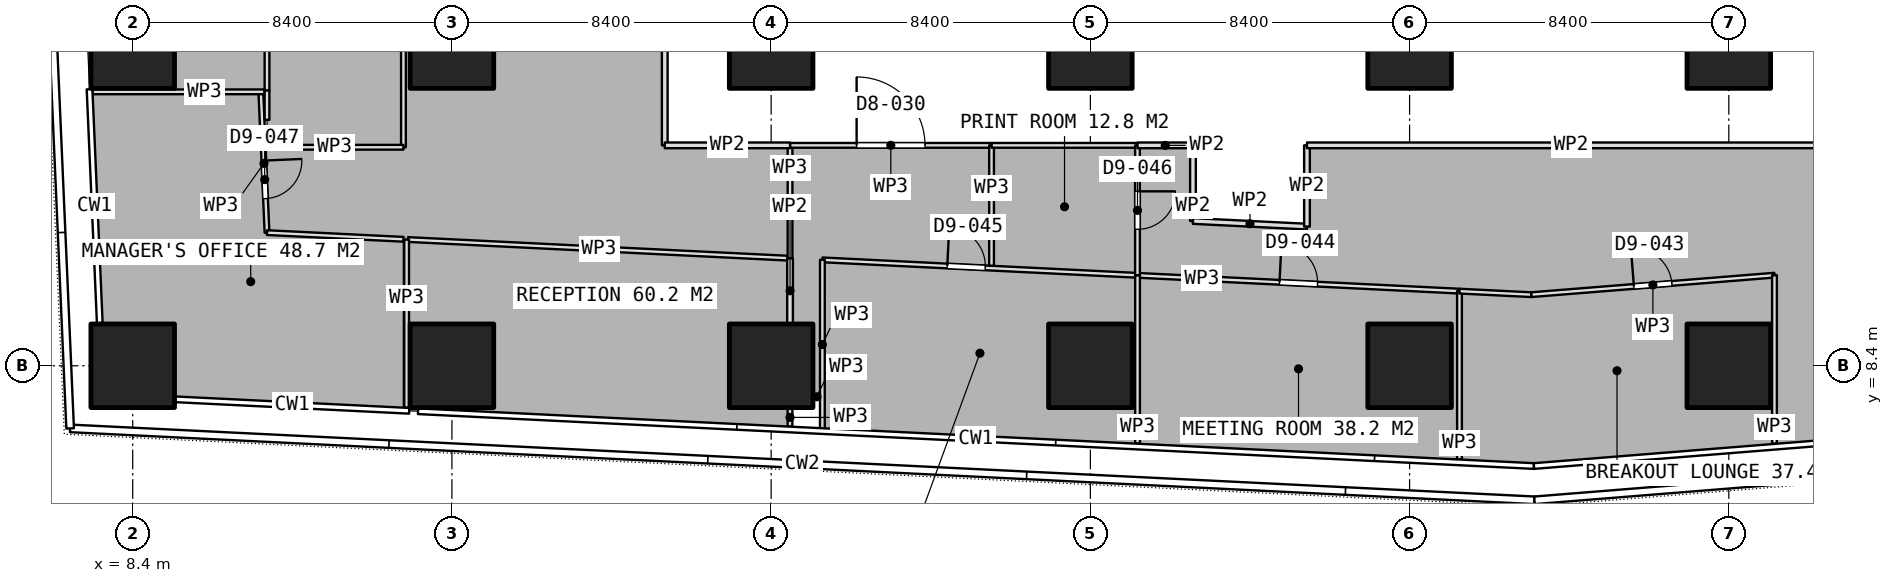
"""IFC4 building model, lengths in metres.
Left out: names, types, materials, properties, quantities, classifications, styles, units other than length and angle.
Written with IfcOpenShell. Run it as: python <this file> out.ifc"""

import sys

from ifc_helpers import new_model, si_unit, direction, frame, frame_2d, origin, origin_2d, place, context, subcontext, project, spatial, rectangle, extrude, element, fill, save


model = new_model("IFC4")
c1 = context("Model", 3, precision=1e-05, world=origin(), true_north=direction((0.0, 1.0)))
c2 = subcontext(c1, "Body", "Model", "MODEL_VIEW")
j1 = project(units=[si_unit("LENGTHUNIT", "METRE"), si_unit("PLANEANGLEUNIT", "RADIAN")], contexts=[c1])
p1 = place(None, origin())
s1 = spatial("IfcSite", under=j1, at=p1, CompositionType="ELEMENT")
p2 = place(p1, origin())
s2 = spatial("IfcBuilding", under=s1, at=p2, CompositionType="ELEMENT")
p3 = place(p2, frame((0.0, 0.0, 32.9)))
s3 = spatial("IfcBuildingStorey", under=s2, at=p3, CompositionType="ELEMENT", Elevation=32.9)
for number, where, z_axis, x_axis in (
    (1, (8.4, 8.4, 0.0), (0.0, 0.0, 1.0), (1.0, 0.0, 0.0)),
    (2, (8.4, 16.8, 0.0), (0.0, 0.0, 1.0), (1.0, 0.0, 0.0)),
    (3, (16.8, 8.4, 0.0), (0.0, 0.0, 1.0), (1.0, 0.0, 0.0)),
    (4, (16.8, 16.8, 0.0), (0.0, 0.0, 1.0), (1.0, 0.0, 0.0)),
    (5, (25.2, 8.4, 0.0), (0.0, 0.0, 1.0), (1.0, 0.0, 0.0)),
    (6, (25.2, 16.8, 0.0), (0.0, 0.0, 1.0), (1.0, 0.0, 0.0)),
    (7, (33.6, 8.4, 0.0), (0.0, 0.0, 1.0), (1.0, 0.0, 0.0)),
    (8, (33.6, 16.8, 0.0), (0.0, 0.0, 1.0), (1.0, 0.0, 0.0)),
    (9, (42.0, 8.4, 0.0), (0.0, 0.0, 1.0), (1.0, 0.0, 0.0)),
    (10, (42.0, 16.8, 0.0), (0.0, 0.0, 1.0), (1.0, 0.0, 0.0)),
    (11, (50.4, 8.4, 0.0), (0.0, 0.0, 1.0), (1.0, 0.0, 0.0)),
    (12, (50.4, 16.8, 0.0), (0.0, 0.0, 1.0), (1.0, 0.0, 0.0)),
):
    element("IfcColumn", number, at=place(p3, frame(where, z_axis=z_axis, x_axis=x_axis)), inside=s3, PredefinedType="COLUMN", context=c2, shape_type="SweptSolid", body=[
        extrude(rectangle(XDim=2.2, YDim=2.2, at=origin_2d()), origin(), (0.0, 0.0, 1.0), 3.75),
    ])
p4 = place(p3, frame((34.841, 10.78, 0.0), z_axis=(0.0, 0.0, 1.0), x_axis=(0.998796515078, -0.049046115723, 0.0)))
e13 = element("IfcWall", 13, at=p4, inside=s3, PredefinedType="PARTITIONING", context=c2, shape_type="SweptSolid", body=[
    extrude(rectangle(XDim=8.482, YDim=0.125, at=frame_2d((4.241, 0.0))), origin(), (0.0, 0.0, 1.0), 3.5),
])
p5 = place(p4, frame((3.741, 0.0, 0.0)))
e14 = element("IfcOpeningElement", 14, at=p5, cuts=e13, PredefinedType="OPENING", context=c2, shape_type="SweptSolid", body=[
    extrude(rectangle(XDim=1.0, YDim=2.1, at=frame_2d((0.5, 1.05))), frame((0.0, 0.073, 0.0), z_axis=(0.0, -1.0, 0.0), x_axis=(1.0, 0.0, 0.0)), (0.0, 0.0, 1.0), 0.145),
])
for number, where, z_axis, x_axis in (
    (15, (43.313, 10.364, 0.0), (0.0, 0.0, 1.0), (0.0, -1.0, 0.0)),
    (16, (34.841, 6.354, 0.0), (0.0, 0.0, 1.0), (0.0, 1.0, 0.0)),
):
    element("IfcWall", number, at=place(p3, frame(where, z_axis=z_axis, x_axis=x_axis)), inside=s3, PredefinedType="PARTITIONING", context=c2, shape_type="SweptSolid", body=[
        extrude(rectangle(XDim=4.426, YDim=0.125, at=frame_2d((2.213, 0.0))), origin(), (0.0, 0.0, 1.0), 3.5),
    ])
p6 = place(p3, frame((43.314, 10.364, 0.0), z_axis=(0.0, 0.0, 1.0), x_axis=(0.998788470102, -0.04920967375, 0.0)))
e17 = element("IfcWall", 17, at=p6, inside=s3, PredefinedType="PARTITIONING", context=c2, shape_type="SweptSolid", body=[
    extrude(rectangle(XDim=1.89, YDim=0.125, at=frame_2d((0.945, 0.0))), origin(), (0.0, 0.0, 1.0), 3.5),
])
p7 = place(p3, frame((45.202, 10.271, 0.0), z_axis=(0.0, 0.0, 1.0), x_axis=(0.996803782356, 0.079888794459, 0.0)))
e18 = element("IfcWall", 18, at=p7, inside=s3, PredefinedType="PARTITIONING", context=c2, shape_type="SweptSolid", body=[
    extrude(rectangle(XDim=6.421, YDim=0.125, at=frame_2d((3.21, 0.0))), origin(), (0.0, 0.0, 1.0), 3.5),
])
p8 = place(p7, frame((2.71, 0.0, 0.0)))
e19 = element("IfcOpeningElement", 19, at=p8, cuts=e18, PredefinedType="OPENING", context=c2, shape_type="SweptSolid", body=[
    extrude(rectangle(XDim=1.0, YDim=2.1, at=frame_2d((0.5, 1.05))), frame((0.0, 0.073, 0.0), z_axis=(0.0, -1.0, 0.0), x_axis=(1.0, 0.0, 0.0)), (0.0, 0.0, 1.0), 0.145),
])
p9 = place(p3, frame((51.602, 10.784, 0.0), z_axis=(0.0, 0.0, 1.0), x_axis=(0.0, -1.0, 0.0)))
e20 = element("IfcWall", 20, at=p9, inside=s3, PredefinedType="PARTITIONING", context=c2, shape_type="SweptSolid", body=[
    extrude(rectangle(XDim=4.435, YDim=0.125, at=frame_2d((2.217, 0.0))), origin(), (0.0, 0.0, 1.0), 3.5),
])
p10 = place(p3, frame((26.548, 11.187, 0.0), z_axis=(0.0, 0.0, 1.0), x_axis=(0.998797680893, -0.049022368804, 0.0)))
e21 = element("IfcWall", 21, at=p10, inside=s3, PredefinedType="PARTITIONING", context=c2, shape_type="SweptSolid", body=[
    extrude(rectangle(XDim=8.302, YDim=0.125, at=frame_2d((4.151, 0.0))), origin(), (0.0, 0.0, 1.0), 3.5),
])
p11 = place(p10, frame((3.291, 0.0, 0.0)))
e22 = element("IfcOpeningElement", 22, at=p11, cuts=e21, PredefinedType="OPENING", context=c2, shape_type="SweptSolid", body=[
    extrude(rectangle(XDim=1.0, YDim=2.1, at=frame_2d((0.5, 1.05))), frame((0.0, 0.073, 0.0), z_axis=(0.0, -1.0, 0.0), x_axis=(1.0, 0.0, 0.0)), (0.0, 0.0, 1.0), 0.145),
])
p12 = place(p3, frame((26.548, 6.732, 0.0), z_axis=(0.0, 0.0, 1.0), x_axis=(0.0, 1.0, 0.0)))
e23 = element("IfcWall", 23, at=p12, inside=s3, PredefinedType="PARTITIONING", context=c2, shape_type="SweptSolid", body=[
    extrude(rectangle(XDim=4.455, YDim=0.125, at=frame_2d((2.228, 0.0))), origin(), (0.0, 0.0, 1.0), 3.5),
])
p13 = place(p3, frame((15.643, 11.722, 0.0), z_axis=(0.0, 0.0, 1.0), x_axis=(0.998800316201, -0.048968646667, 0.0)))
e24 = element("IfcWall", 24, at=p13, inside=s3, PredefinedType="PARTITIONING", context=c2, shape_type="SweptSolid", body=[
    extrude(rectangle(XDim=10.066, YDim=0.125, at=frame_2d((5.033, 0.0))), origin(), (0.0, 0.0, 1.0), 3.5),
])
p14 = place(p3, frame((25.697, 11.229, 0.0), z_axis=(0.0, 0.0, 1.0), x_axis=(0.0, 1.0, 0.0)))
e25 = element("IfcWall", 25, at=p14, inside=s3, PredefinedType="PARTITIONING", context=c2, shape_type="SweptSolid", body=[
    extrude(rectangle(XDim=2.971, YDim=0.125, at=frame_2d((1.485, 0.0))), origin(), (0.0, 0.0, 1.0), 3.5),
])
p15 = place(p3, frame((25.697, 14.2, 0.0), z_axis=(0.0, 0.0, 1.0), x_axis=(1.0, 0.0, 0.0)))
e26 = element("IfcWall", 26, at=p15, inside=s3, PredefinedType="PARTITIONING", context=c2, shape_type="SweptSolid", body=[
    extrude(rectangle(XDim=5.303, YDim=0.125, at=frame_2d((2.651, 0.0))), origin(), (0.0, 0.0, 1.0), 3.5),
])
p16 = place(p15, frame((1.752, 0.0, 0.0)))
e27 = element("IfcOpeningElement", 27, at=p16, cuts=e26, PredefinedType="OPENING", context=c2, shape_type="SweptSolid", body=[
    extrude(rectangle(XDim=1.8, YDim=2.1, at=frame_2d((0.9, 1.05))), frame((0.0, 0.073, 0.0), z_axis=(0.0, -1.0, 0.0), x_axis=(1.0, 0.0, 0.0)), (0.0, 0.0, 1.0), 0.145),
])
p17 = place(p3, frame((31.0, 14.2, 0.0), z_axis=(0.0, 0.0, 1.0), x_axis=(0.0, -1.0, 0.0)))
e28 = element("IfcWall", 28, at=p17, inside=s3, PredefinedType="PARTITIONING", context=c2, shape_type="SweptSolid", body=[
    extrude(rectangle(XDim=3.169, YDim=0.125, at=frame_2d((1.584, 0.0))), origin(), (0.0, 0.0, 1.0), 3.5),
])
p18 = place(p3, frame((26.485, 7.584, 0.0), z_axis=(0.0, 0.0, 1.0), x_axis=(-1.0, 0.0, 0.0)))
e29 = element("IfcWall", 29, at=p18, inside=s3, PredefinedType="PARTITIONING", context=c2, shape_type="SweptSolid", body=[
    extrude(rectangle(XDim=0.165, YDim=0.125, at=frame_2d((0.083, 0.0))), origin(), (0.0, 0.0, 1.0), 3.5),
])
p19 = place(p3, frame((25.696, 7.28, 0.0), z_axis=(0.0, 0.0, 1.0), x_axis=(0.0, -1.0, 0.0)))
e30 = element("IfcWall", 30, at=p19, inside=s3, PredefinedType="PARTITIONING", context=c2, shape_type="SweptSolid", body=[
    extrude(rectangle(XDim=0.477, YDim=0.125, at=frame_2d((0.239, 0.0))), origin(), (0.0, 0.0, 1.0), 3.5),
])
p20 = place(p3, frame((15.608, 7.299, 0.0), z_axis=(0.0, 0.0, 1.0), x_axis=(0.0, 1.0, 0.0)))
e31 = element("IfcWall", 31, at=p20, inside=s3, PredefinedType="PARTITIONING", context=c2, shape_type="SweptSolid", body=[
    extrude(rectangle(XDim=4.423, YDim=0.125, at=frame_2d((2.211, 0.0))), origin(), (0.0, 0.0, 1.0), 3.5),
])
p21 = place(p3, frame((31.0, 14.2, 0.0), z_axis=(0.0, 0.0, 1.0), x_axis=(1.0, 0.0, 0.0)))
e32 = element("IfcWall", 32, at=p21, inside=s3, PredefinedType="PARTITIONING", context=c2, shape_type="SweptSolid", body=[
    extrude(rectangle(XDim=3.84, YDim=0.125, at=frame_2d((1.92, 0.0))), origin(), (0.0, 0.0, 1.0), 3.5),
])
p22 = place(p3, frame((34.84, 14.2, 0.0), z_axis=(0.0, 0.0, 1.0), x_axis=(0.0, -1.0, 0.0)))
e33 = element("IfcWall", 33, at=p22, inside=s3, PredefinedType="PARTITIONING", context=c2, shape_type="SweptSolid", body=[
    extrude(rectangle(XDim=3.42, YDim=0.125, at=frame_2d((1.71, 0.0))), origin(), (0.0, 0.0, 1.0), 3.5),
])
p23 = place(p22, frame((1.21, 0.0, 0.0)))
e34 = element("IfcOpeningElement", 34, at=p23, cuts=e33, PredefinedType="OPENING", context=c2, shape_type="SweptSolid", body=[
    extrude(rectangle(XDim=1.0, YDim=2.1, at=frame_2d((0.5, 1.05))), frame((0.0, 0.073, 0.0), z_axis=(0.0, -1.0, 0.0), x_axis=(1.0, 0.0, 0.0)), (0.0, 0.0, 1.0), 0.145),
])
p24 = place(p3, frame((34.84, 14.2, 0.0), z_axis=(0.0, 0.0, 1.0), x_axis=(1.0, 0.0, 0.0)))
e35 = element("IfcWall", 35, at=p24, inside=s3, PredefinedType="PARTITIONING", context=c2, shape_type="SweptSolid", body=[
    extrude(rectangle(XDim=1.46, YDim=0.15, at=frame_2d((0.73, 0.0))), origin(), (0.0, 0.0, 1.0), 3.5),
])
p25 = place(p3, frame((36.3, 14.2, 0.0), z_axis=(0.0, 0.0, 1.0), x_axis=(0.0, -1.0, 0.0)))
e36 = element("IfcWall", 36, at=p25, inside=s3, PredefinedType="PARTITIONING", context=c2, shape_type="SweptSolid", body=[
    extrude(rectangle(XDim=1.99, YDim=0.15, at=frame_2d((0.995, 0.0))), origin(), (0.0, 0.0, 1.0), 3.5),
])
p26 = place(p3, frame((36.3, 12.21, 0.0), z_axis=(0.0, 0.0, 1.0), x_axis=(0.998786159732, -0.04925654401, 0.0)))
e37 = element("IfcWall", 37, at=p26, inside=s3, PredefinedType="PARTITIONING", context=c2, shape_type="SweptSolid", body=[
    extrude(rectangle(XDim=3.004, YDim=0.15, at=frame_2d((1.502, 0.0))), origin(), (0.0, 0.0, 1.0), 3.5),
])
p27 = place(p3, frame((39.3, 12.062, 0.0), z_axis=(0.0, 0.0, 1.0), x_axis=(0.0, 1.0, 0.0)))
e38 = element("IfcWall", 38, at=p27, inside=s3, PredefinedType="PARTITIONING", context=c2, shape_type="SweptSolid", body=[
    extrude(rectangle(XDim=2.138, YDim=0.15, at=frame_2d((1.069, 0.0))), origin(), (0.0, 0.0, 1.0), 3.5),
])
p28 = place(p3, frame((39.3, 14.2, 0.0), z_axis=(0.0, 0.0, 1.0), x_axis=(1.0, 0.0, 0.0)))
e39 = element("IfcWall", 39, at=p28, inside=s3, PredefinedType="PARTITIONING", context=c2, shape_type="SweptSolid", body=[
    extrude(rectangle(XDim=13.9, YDim=0.15, at=frame_2d((6.95, 0.0))), origin(), (0.0, 0.0, 1.0), 3.5),
])
p29 = place(p3, frame((11.934, 28.2, 0.0), z_axis=(0.0, 0.0, 1.0), x_axis=(0.0, -1.0, 0.0)))
e40 = element("IfcWall", 40, at=p29, inside=s3, PredefinedType="PARTITIONING", context=c2, shape_type="SweptSolid", body=[
    extrude(rectangle(XDim=12.557, YDim=0.125, at=frame_2d((6.278, 0.0))), origin(), (0.0, 0.0, 1.0), 3.5),
])
p30 = place(p3, frame((11.871, 15.608, 0.0), z_axis=(0.0, 0.0, 1.0), x_axis=(-1.0, 0.0, 0.0)))
e41 = element("IfcWall", 41, at=p30, inside=s3, PredefinedType="PARTITIONING", context=c2, shape_type="SweptSolid", body=[
    extrude(rectangle(XDim=4.524, YDim=0.125, at=frame_2d((2.262, 0.0))), origin(), (0.0, 0.0, 1.0), 3.5),
])
p31 = place(p3, frame((11.774, 15.546, 0.0), z_axis=(0.0, 0.0, 1.0), x_axis=(0.043934208205, -0.999034426509, 0.0)))
e42 = element("IfcWall", 42, at=p31, inside=s3, PredefinedType="PARTITIONING", context=c2, shape_type="SweptSolid", body=[
    extrude(rectangle(XDim=3.645, YDim=0.125, at=frame_2d((1.823, 0.0))), origin(), (0.0, 0.0, 1.0), 3.5),
])
p32 = place(p31, frame((1.749, 0.0, 0.0)))
e43 = element("IfcOpeningElement", 43, at=p32, cuts=e42, PredefinedType="OPENING", context=c2, shape_type="SweptSolid", body=[
    extrude(rectangle(XDim=1.0, YDim=2.1, at=frame_2d((0.5, 1.05))), frame((0.0, 0.073, 0.0), z_axis=(0.0, -1.0, 0.0), x_axis=(1.0, 0.0, 0.0)), (0.0, 0.0, 1.0), 0.145),
])
p33 = place(p3, frame((11.934, 11.904, 0.0), z_axis=(0.0, 0.0, 1.0), x_axis=(0.998799983391, -0.048975434441, 0.0)))
e44 = element("IfcWall", 44, at=p33, inside=s3, PredefinedType="PARTITIONING", context=c2, shape_type="SweptSolid", body=[
    extrude(rectangle(XDim=3.594, YDim=0.125, at=frame_2d((1.797, 0.0))), origin(), (0.0, 0.0, 1.0), 3.5),
])
p34 = place(p3, frame((15.524, 28.2, 0.0), z_axis=(0.0, 0.0, 1.0), x_axis=(0.0, -1.0, 0.0)))
e45 = element("IfcWall", 45, at=p34, inside=s3, PredefinedType="PARTITIONING", context=c2, shape_type="SweptSolid", body=[
    extrude(rectangle(XDim=14.05, YDim=0.125, at=frame_2d((7.025, 0.0))), origin(), (0.0, 0.0, 1.0), 3.5),
])
p35 = place(p34, frame((6.125, 0.0, 0.0)))
e46 = element("IfcOpeningElement", 46, at=p35, cuts=e45, PredefinedType="OPENING", context=c2, shape_type="SweptSolid", body=[
    extrude(rectangle(XDim=1.8, YDim=2.1, at=frame_2d((0.9, 1.05))), frame((0.0, 0.073, 0.0), z_axis=(0.0, -1.0, 0.0), x_axis=(1.0, 0.0, 0.0)), (0.0, 0.0, 1.0), 0.145),
])
p36 = place(p3, frame((15.524, 14.15, 0.0), z_axis=(0.0, 0.0, 1.0), x_axis=(-1.0, 0.0, 0.0)))
e47 = element("IfcWall", 47, at=p36, inside=s3, PredefinedType="PARTITIONING", context=c2, shape_type="SweptSolid", body=[
    extrude(rectangle(XDim=3.626, YDim=0.125, at=frame_2d((1.813, 0.0))), origin(), (0.0, 0.0, 1.0), 3.5),
])
p37 = place(p3, frame((11.934, 14.871, 0.0), z_axis=(0.0, 0.0, 1.0), x_axis=(0.0, 1.0, 0.0)))
e48 = element("IfcWall", 48, at=p37, inside=s3, PredefinedType="PARTITIONING", context=c2, shape_type="SweptSolid", body=[
    extrude(rectangle(XDim=0.772, YDim=0.125, at=frame_2d((0.386, 0.0))), origin(), (0.0, 0.0, 1.0), 3.5),
])
p38 = place(p3, frame((22.4, 28.2, 0.0), z_axis=(0.0, 0.0, 1.0), x_axis=(0.0, -1.0, 0.0)))
e49 = element("IfcWall", 49, at=p38, inside=s3, PredefinedType="PARTITIONING", context=c2, shape_type="SweptSolid", body=[
    extrude(rectangle(XDim=14.0, YDim=0.15, at=frame_2d((7.0, 0.0))), origin(), (0.0, 0.0, 1.0), 3.5),
])
p39 = place(p38, frame((6.5, 0.0, 0.0)))
e50 = element("IfcOpeningElement", 50, at=p39, cuts=e49, PredefinedType="OPENING", context=c2, shape_type="SweptSolid", body=[
    extrude(rectangle(XDim=1.0, YDim=2.1, at=frame_2d((0.5, 1.05))), frame((0.0, 0.085, 0.0), z_axis=(0.0, -1.0, 0.0), x_axis=(1.0, 0.0, 0.0)), (0.0, 0.0, 1.0), 0.17),
])
p40 = place(p3, frame((22.4, 14.2, 0.0), z_axis=(0.0, 0.0, 1.0), x_axis=(1.0, 0.0, 0.0)))
e51 = element("IfcWall", 51, at=p40, inside=s3, PredefinedType="PARTITIONING", context=c2, shape_type="SweptSolid", body=[
    extrude(rectangle(XDim=3.297, YDim=0.15, at=frame_2d((1.648, 0.0))), origin(), (0.0, 0.0, 1.0), 3.5),
])
p41 = place(p3, frame((25.697, 11.229, 0.0), z_axis=(0.0, 0.0, 1.0), x_axis=(0.0, -1.0, 0.0)))
e52 = element("IfcWall", 52, at=p41, inside=s3, PredefinedType="PARTITIONING", context=c2, shape_type="SweptSolid", body=[
    extrude(rectangle(XDim=1.709, YDim=0.15, at=frame_2d((0.854, 0.0))), origin(), (0.0, 0.0, 1.0), 3.5),
])
p42 = place(p5, origin())
e53 = element("IfcDoor", 53, at=p42, inside=s3, OperationType="SINGLE_SWING_LEFT", PredefinedType="DOOR", context=c2, shape_type="SweptSolid", body=[
    extrude(rectangle(XDim=1.0, YDim=2.1, at=frame_2d((0.5, 1.05))), frame((0.0, 0.025, 0.0), z_axis=(0.0, -1.0, 0.0), x_axis=(1.0, 0.0, 0.0)), (0.0, 0.0, 1.0), 0.05),
])
fill(e14, e53)
p43 = place(p8, origin())
e54 = element("IfcDoor", 54, at=p43, inside=s3, OperationType="SINGLE_SWING_LEFT", PredefinedType="DOOR", context=c2, shape_type="SweptSolid", body=[
    extrude(rectangle(XDim=1.0, YDim=2.1, at=frame_2d((0.5, 1.05))), frame((0.0, 0.025, 0.0), z_axis=(0.0, -1.0, 0.0), x_axis=(1.0, 0.0, 0.0)), (0.0, 0.0, 1.0), 0.05),
])
fill(e19, e54)
p44 = place(p16, origin())
e55 = element("IfcDoor", 55, at=p44, inside=s3, OperationType="DOUBLE_DOOR_SINGLE_SWING", PredefinedType="DOOR", context=c2, shape_type="SweptSolid", body=[
    extrude(rectangle(XDim=1.8, YDim=2.1, at=frame_2d((0.9, 1.05))), frame((0.0, 0.025, 0.0), z_axis=(0.0, -1.0, 0.0), x_axis=(1.0, 0.0, 0.0)), (0.0, 0.0, 1.0), 0.05),
])
fill(e27, e55)
p45 = place(p23, origin())
e56 = element("IfcDoor", 56, at=p45, inside=s3, OperationType="SINGLE_SWING_LEFT", PredefinedType="DOOR", context=c2, shape_type="SweptSolid", body=[
    extrude(rectangle(XDim=1.0, YDim=2.1, at=frame_2d((0.5, 1.05))), frame((0.0, 0.025, 0.0), z_axis=(0.0, -1.0, 0.0), x_axis=(1.0, 0.0, 0.0)), (0.0, 0.0, 1.0), 0.05),
])
fill(e34, e56)
p46 = place(p32, origin())
e57 = element("IfcDoor", 57, at=p46, inside=s3, OperationType="SINGLE_SWING_LEFT", PredefinedType="DOOR", context=c2, shape_type="SweptSolid", body=[
    extrude(rectangle(XDim=1.0, YDim=2.1, at=frame_2d((0.5, 1.05))), frame((0.0, 0.025, 0.0), z_axis=(0.0, -1.0, 0.0), x_axis=(1.0, 0.0, 0.0)), (0.0, 0.0, 1.0), 0.05),
])
fill(e43, e57)
p47 = place(p11, origin())
e58 = element("IfcDoor", 58, at=p47, inside=s3, OperationType="SINGLE_SWING_LEFT", PredefinedType="DOOR", context=c2, shape_type="SweptSolid", body=[
    extrude(rectangle(XDim=1.0, YDim=2.1, at=frame_2d((0.5, 1.05))), frame((0.0, 0.025, 0.0), z_axis=(0.0, -1.0, 0.0), x_axis=(1.0, 0.0, 0.0)), (0.0, 0.0, 1.0), 0.05),
])
fill(e22, e58)
save(model, sys.argv[1])
